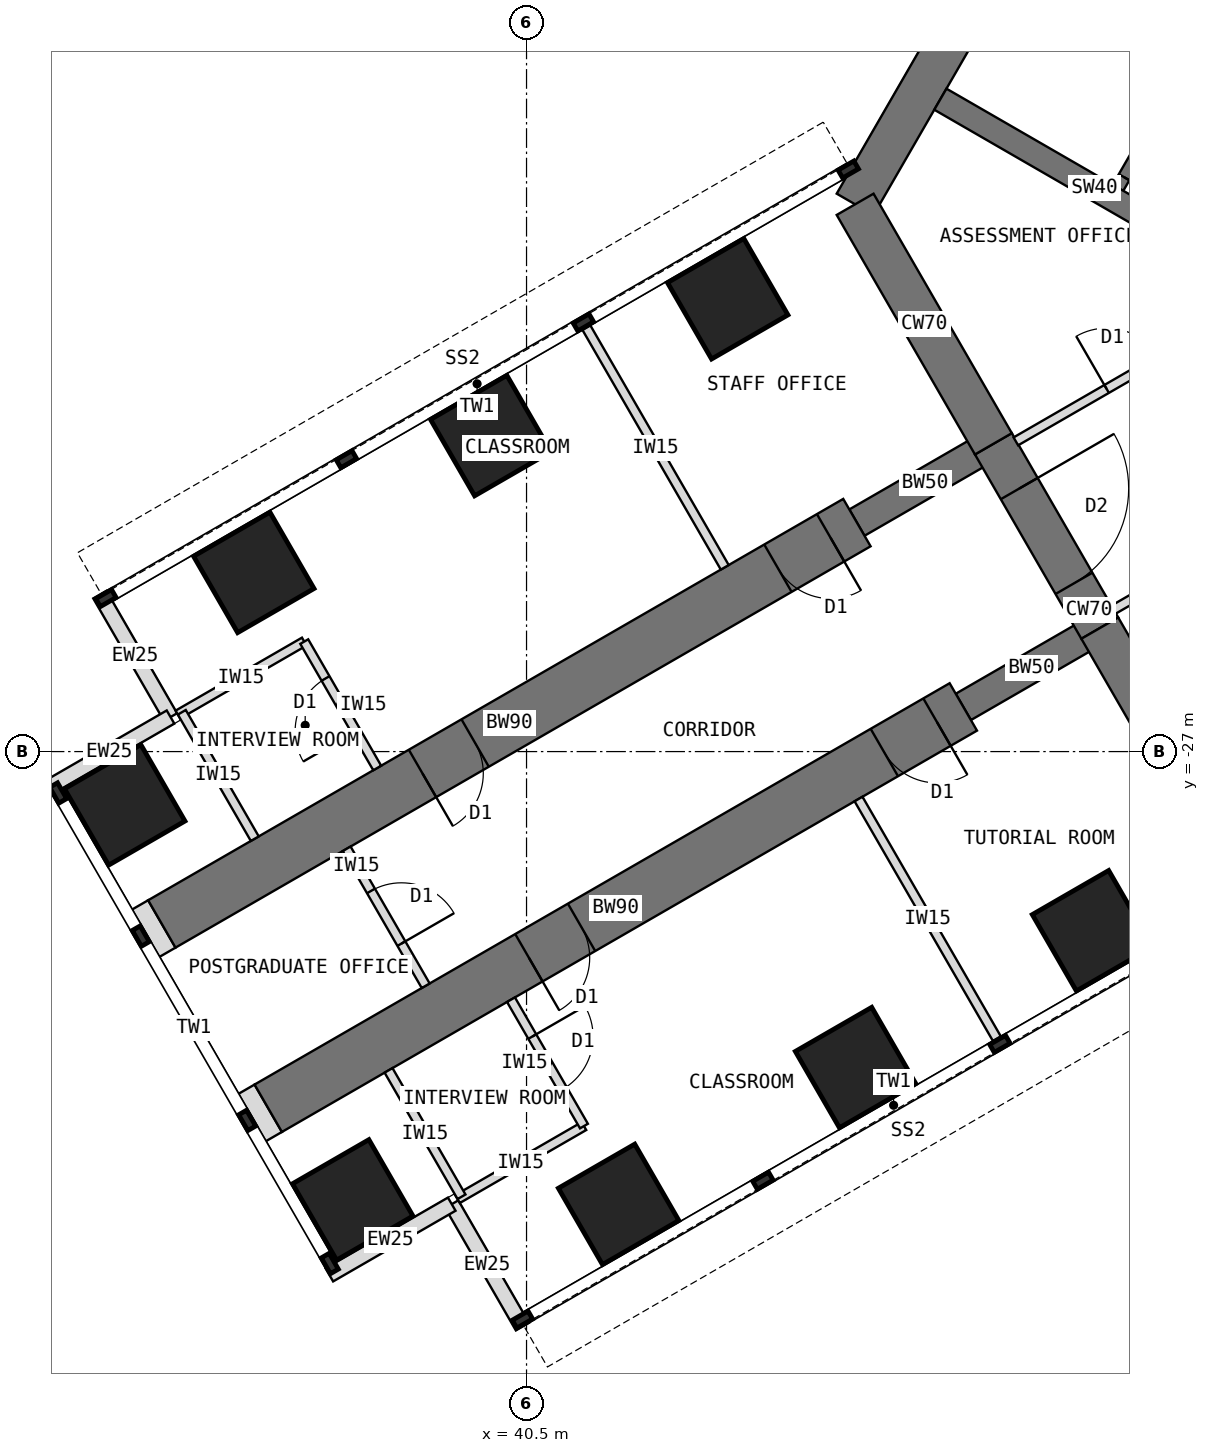
"""IFC4 building model, lengths in metres.
Left out: names, types, materials, properties, quantities, classifications, styles, units other than length and angle.
Written with IfcOpenShell. Run it as: python <this file> out.ifc"""

import sys

from ifc_helpers import new_model, si_unit, direction, frame, frame_2d, origin, origin_2d, place, context, subcontext, project, spatial, rectangle, extrude, element, fill, save


model = new_model("IFC4")
c1 = context("Model", 3, precision=1e-05, world=origin(), true_north=direction((0.0, 1.0)))
c2 = subcontext(c1, "Body", "Model", "MODEL_VIEW")
j1 = project(units=[si_unit("LENGTHUNIT", "METRE"), si_unit("PLANEANGLEUNIT", "RADIAN")], contexts=[c1])
p1 = place(None, origin())
s1 = spatial("IfcSite", under=j1, at=p1, CompositionType="ELEMENT")
p2 = place(p1, origin())
s2 = spatial("IfcBuilding", under=s1, at=p2, CompositionType="ELEMENT")
p3 = place(p2, frame((0.0, 0.0, 48.5)))
s3 = spatial("IfcBuildingStorey", under=s2, at=p3, CompositionType="ELEMENT", Elevation=48.5)
p4 = place(p3, frame((52.202, -7.092, 0.0), z_axis=(0.0, 0.0, 1.0), x_axis=(-0.500005998175, -0.866021940709, 0.0)))
e1 = element("IfcWall", 1, at=p4, inside=s3, PredefinedType="SHEAR", context=c2, shape_type="SweptSolid", body=[
    extrude(rectangle(XDim=12.596, YDim=0.7, at=frame_2d((6.298, 0.0))), origin(), (0.0, 0.0, 1.0), 4.0),
])
p5 = place(p3, frame((45.904, -18.0, 0.0), z_axis=(0.0, 0.0, 1.0), x_axis=(0.500024481964, -0.866011268655, 0.0)))
e2 = element("IfcWall", 2, at=p5, inside=s3, PredefinedType="SHEAR", context=c2, shape_type="SweptSolid", body=[
    extrude(rectangle(XDim=4.548, YDim=0.7, at=frame_2d((2.274, 0.0))), origin(), (0.0, 0.0, 1.0), 4.0),
])
p6 = place(p3, frame((48.178, -21.939, 0.0), z_axis=(0.0, 0.0, 1.0), x_axis=(0.500010275428, -0.866019471182, 0.0)))
e3 = element("IfcWall", 3, at=p6, inside=s3, PredefinedType="SHEAR", context=c2, shape_type="SweptSolid", body=[
    extrude(rectangle(XDim=3.5, YDim=0.7, at=frame_2d((1.75, 0.0))), origin(), (0.0, 0.0, 1.0), 4.0),
])
p7 = place(p6, frame((0.85, 0.0, 0.0)))
e4 = element("IfcOpeningElement", 4, at=p7, cuts=e3, PredefinedType="OPENING", context=c2, shape_type="SweptSolid", body=[
    extrude(rectangle(XDim=1.8, YDim=2.1, at=frame_2d((0.9, 1.05))), frame((0.0, 0.36, 0.0), z_axis=(0.0, -1.0, 0.0), x_axis=(1.0, 0.0, 0.0)), (0.0, 0.0, 1.0), 0.72),
])
p8 = place(p3, frame((49.928, -24.97, 0.0), z_axis=(0.0, 0.0, 1.0), x_axis=(0.499984222037, -0.866034513004, 0.0)))
e5 = element("IfcWall", 5, at=p8, inside=s3, PredefinedType="SHEAR", context=c2, shape_type="SweptSolid", body=[
    extrude(rectangle(XDim=4.548, YDim=0.7, at=frame_2d((2.274, 0.0))), origin(), (0.0, 0.0, 1.0), 4.0),
])
p9 = place(p3, frame((49.928, -24.97, 0.0), z_axis=(0.0, 0.0, 1.0), x_axis=(-0.866031863473, -0.499988811324, 0.0)))
e6 = element("IfcWall", 6, at=p9, inside=s3, PredefinedType="SHEAR", context=c2, shape_type="SweptSolid", body=[
    extrude(rectangle(XDim=2.592, YDim=0.5, at=frame_2d((1.296, 0.0))), origin(), (0.0, 0.0, 1.0), 4.0),
])
p10 = place(p3, frame((47.684, -26.266, 0.0), z_axis=(0.0, 0.0, 1.0), x_axis=(-0.866027579429, -0.499996231654, 0.0)))
e7 = element("IfcWall", 7, at=p10, inside=s3, PredefinedType="SHEAR", context=c2, shape_type="SweptSolid", body=[
    extrude(rectangle(XDim=13.2, YDim=0.9, at=frame_2d((6.6, 0.0))), origin(), (0.0, 0.0, 1.0), 4.0),
])
p11 = place(p10, frame((0.5, 0.0, 0.0)))
e8 = element("IfcOpeningElement", 8, at=p11, cuts=e7, PredefinedType="OPENING", context=c2, shape_type="SweptSolid", body=[
    extrude(rectangle(XDim=1.0, YDim=2.1, at=frame_2d((0.5, 1.05))), frame((0.0, 0.46, 0.0), z_axis=(0.0, -1.0, 0.0), x_axis=(1.0, 0.0, 0.0)), (0.0, 0.0, 1.0), 0.92),
])
p12 = place(p10, frame((7.25, 0.0, 0.0)))
e9 = element("IfcOpeningElement", 9, at=p12, cuts=e7, PredefinedType="OPENING", context=c2, shape_type="SweptSolid", body=[
    extrude(rectangle(XDim=1.0, YDim=2.1, at=frame_2d((0.5, 1.05))), frame((0.0, 0.46, 0.0), z_axis=(0.0, -1.0, 0.0), x_axis=(1.0, 0.0, 0.0)), (0.0, 0.0, 1.0), 0.92),
])
p13 = place(p3, frame((48.178, -21.939, 0.0), z_axis=(0.0, 0.0, 1.0), x_axis=(-0.866072649678, -0.499918158782, 0.0)))
e10 = element("IfcWall", 10, at=p13, inside=s3, PredefinedType="SHEAR", context=c2, shape_type="SweptSolid", body=[
    extrude(rectangle(XDim=2.592, YDim=0.5, at=frame_2d((1.296, 0.0))), origin(), (0.0, 0.0, 1.0), 4.0),
])
p14 = place(p3, frame((45.934, -23.234, 0.0), z_axis=(0.0, 0.0, 1.0), x_axis=(-0.866019570528, -0.500010103361, 0.0)))
e11 = element("IfcWall", 11, at=p14, inside=s3, PredefinedType="SHEAR", context=c2, shape_type="SweptSolid", body=[
    extrude(rectangle(XDim=13.2, YDim=0.9, at=frame_2d((6.6, 0.0))), origin(), (0.0, 0.0, 1.0), 4.0),
])
p15 = place(p14, frame((0.5, 0.0, 0.0)))
e12 = element("IfcOpeningElement", 12, at=p15, cuts=e11, PredefinedType="OPENING", context=c2, shape_type="SweptSolid", body=[
    extrude(rectangle(XDim=1.0, YDim=2.1, at=frame_2d((0.5, 1.05))), frame((0.0, 0.46, 0.0), z_axis=(0.0, -1.0, 0.0), x_axis=(1.0, 0.0, 0.0)), (0.0, 0.0, 1.0), 0.92),
])
p16 = place(p14, frame((7.25, 0.0, 0.0)))
e13 = element("IfcOpeningElement", 13, at=p16, cuts=e11, PredefinedType="OPENING", context=c2, shape_type="SweptSolid", body=[
    extrude(rectangle(XDim=1.0, YDim=2.1, at=frame_2d((0.5, 1.05))), frame((0.0, 0.46, 0.0), z_axis=(0.0, -1.0, 0.0), x_axis=(1.0, 0.0, 0.0)), (0.0, 0.0, 1.0), 0.92),
])
for number, where, z_axis, x_axis in (
    (14, (49.809, -29.946, 0.0), (0.0, 0.0, 1.0), (0.866, 0.5, 0.0)),
    (15, (43.809, -19.554, 0.0), (0.0, 0.0, 1.0), (0.866, 0.5, 0.0)),
    (16, (45.912, -32.196, 0.0), (0.0, 0.0, 1.0), (0.866, 0.5, 0.0)),
    (17, (39.912, -21.804, 0.0), (0.0, 0.0, 1.0), (0.866, 0.5, 0.0)),
    (18, (42.014, -34.446, 0.0), (0.0, 0.0, 1.0), (0.866, 0.5, 0.0)),
    (19, (36.014, -24.054, 0.0), (0.0, 0.0, 1.0), (0.866, 0.5, 0.0)),
    (20, (37.642, -34.373, 0.0), (0.0, 0.0, 1.0), (0.866, 0.5, 0.0)),
    (21, (33.892, -27.877, 0.0), (0.0, 0.0, 1.0), (0.866, 0.5, 0.0)),
):
    element("IfcColumn", number, at=place(p3, frame(where, z_axis=z_axis, x_axis=x_axis)), inside=s3, PredefinedType="COLUMN", context=c2, shape_type="SweptSolid", body=[
        extrude(rectangle(XDim=1.45, YDim=1.45, at=origin_2d()), origin(), (0.0, 0.0, 1.0), 4.0),
    ])
for number, where, z_axis, x_axis in (
    (22, (40.433, -36.456, 0.0), (0.0, 0.0, 1.0), (-0.5, 0.866, 0.0)),
    (23, (39.27, -34.443, 0.0), (0.0, 0.0, 1.0), (-0.866, -0.5, 0.0)),
    (24, (33.483, -24.419, 0.0), (0.0, 0.0, 1.0), (0.5, -0.866, 0.0)),
    (25, (34.645, -26.432, 0.0), (0.0, 0.0, 1.0), (-0.866, -0.5, 0.0)),
):
    element("IfcWall", number, at=place(p3, frame(where, z_axis=z_axis, x_axis=x_axis)), inside=s3, PredefinedType="STANDARD", context=c2, shape_type="SweptSolid", body=[
        extrude(rectangle(XDim=2.325, YDim=0.25, at=frame_2d((1.163, 0.0))), origin(), (0.0, 0.0, 1.0), 3.8),
    ])
for number, where, z_axis, x_axis in (
    (26, (36.252, -32.865, 0.0), (0.0, 0.0, 1.0), (-0.866, -0.5, 0.0)),
    (27, (34.502, -29.834, 0.0), (0.0, 0.0, 1.0), (-0.866, -0.5, 0.0)),
):
    element("IfcWall", number, at=place(p3, frame(where, z_axis=z_axis, x_axis=x_axis)), inside=s3, PredefinedType="PARTITIONING", context=c2, shape_type="SweptSolid", body=[
        extrude(rectangle(XDim=0.31, YDim=0.9, at=frame_2d((0.155, 0.0))), origin(), (0.0, 0.0, 1.0), 3.8),
    ])
p17 = place(p3, frame((54.178, -10.886, 0.0), z_axis=(0.0, 0.0, 1.0), x_axis=(-0.49999894854, -0.866026010844, 0.0)))
e28 = element("IfcWall", 28, at=p17, inside=s3, PredefinedType="SHEAR", context=c2, shape_type="SweptSolid", body=[
    extrude(rectangle(XDim=8.0, YDim=0.2, at=frame_2d((4.0, 0.0))), origin(), (0.0, 0.0, 1.0), 4.0),
])
p18 = place(p17, frame((6.8, 0.0, 0.0)))
e29 = element("IfcOpeningElement", 29, at=p18, cuts=e28, PredefinedType="OPENING", context=c2, shape_type="SweptSolid", body=[
    extrude(rectangle(XDim=0.9, YDim=2.1, at=frame_2d((0.45, 1.05))), frame((0.0, 0.11, 0.0), z_axis=(0.0, -1.0, 0.0), x_axis=(1.0, 0.0, 0.0)), (0.0, 0.0, 1.0), 0.22),
])
p19 = place(p3, frame((52.38, -19.201, 0.0), z_axis=(0.0, 0.0, 1.0), x_axis=(-0.866023886965, 0.500002627198, 0.0)))
e30 = element("IfcWall", 30, at=p19, inside=s3, PredefinedType="SHEAR", context=c2, shape_type="SweptSolid", body=[
    extrude(rectangle(XDim=5.858, YDim=0.4, at=frame_2d((2.929, 0.0))), origin(), (0.0, 0.0, 1.0), 4.0),
])
p20 = place(p3, frame((45.96, -27.78, 0.0), z_axis=(0.0, 0.0, 1.0), x_axis=(0.499982560684, -0.866035472144, 0.0)))
e31 = element("IfcWall", 31, at=p20, inside=s3, PredefinedType="PARTITIONING", context=c2, shape_type="SweptSolid", body=[
    extrude(rectangle(XDim=4.55, YDim=0.15, at=frame_2d((2.275, 0.0))), origin(), (0.0, 0.0, 1.0), 3.8),
])
p21 = place(p3, frame((41.444, -33.159, 0.0), z_axis=(0.0, 0.0, 1.0), x_axis=(-0.866024647952, -0.500001309137, 0.0)))
e32 = element("IfcWall", 32, at=p21, inside=s3, PredefinedType="PARTITIONING", context=c2, shape_type="SweptSolid", body=[
    extrude(rectangle(XDim=2.4, YDim=0.15, at=frame_2d((1.2, 0.0))), origin(), (0.0, 0.0, 1.0), 3.8),
])
p22 = place(p3, frame((40.244, -31.08, 0.0), z_axis=(0.0, 0.0, 1.0), x_axis=(0.500001309137, -0.866024647952, 0.0)))
e33 = element("IfcWall", 33, at=p22, inside=s3, PredefinedType="PARTITIONING", context=c2, shape_type="SweptSolid", body=[
    extrude(rectangle(XDim=2.4, YDim=0.15, at=frame_2d((1.2, 0.0))), origin(), (0.0, 0.0, 1.0), 3.8),
])
p23 = place(p22, frame((0.7, 0.0, 0.0)))
e34 = element("IfcOpeningElement", 34, at=p23, cuts=e33, PredefinedType="OPENING", context=c2, shape_type="SweptSolid", body=[
    extrude(rectangle(XDim=1.0, YDim=2.1, at=frame_2d((0.5, 1.05))), frame((0.0, 0.085, 0.0), z_axis=(0.0, -1.0, 0.0), x_axis=(1.0, 0.0, 0.0)), (0.0, 0.0, 1.0), 0.17),
])
p24 = place(p3, frame((38.231, -32.243, 0.0), z_axis=(0.0, 0.0, 1.0), x_axis=(0.500033551112, -0.866006032174, 0.0)))
e35 = element("IfcWall", 35, at=p24, inside=s3, PredefinedType="PARTITIONING", context=c2, shape_type="SweptSolid", body=[
    extrude(rectangle(XDim=2.4, YDim=0.15, at=frame_2d((1.2, 0.0))), origin(), (0.0, 0.0, 1.0), 3.8),
])
p25 = place(p3, frame((43.76, -23.97, 0.0), z_axis=(0.0, 0.0, 1.0), x_axis=(-0.499982560684, 0.866035472144, 0.0)))
e36 = element("IfcWall", 36, at=p25, inside=s3, PredefinedType="PARTITIONING", context=c2, shape_type="SweptSolid", body=[
    extrude(rectangle(XDim=4.55, YDim=0.15, at=frame_2d((2.275, 0.0))), origin(), (0.0, 0.0, 1.0), 3.8),
])
p26 = place(p3, frame((36.844, -25.191, 0.0), z_axis=(0.0, 0.0, 1.0), x_axis=(-0.865980596518, -0.500077600433, 0.0)))
e37 = element("IfcWall", 37, at=p26, inside=s3, PredefinedType="PARTITIONING", context=c2, shape_type="SweptSolid", body=[
    extrude(rectangle(XDim=2.4, YDim=0.15, at=frame_2d((1.2, 0.0))), origin(), (0.0, 0.0, 1.0), 3.8),
])
p27 = place(p3, frame((38.044, -27.27, 0.0), z_axis=(0.0, 0.0, 1.0), x_axis=(-0.500033551112, 0.866006032174, 0.0)))
e38 = element("IfcWall", 38, at=p27, inside=s3, PredefinedType="PARTITIONING", context=c2, shape_type="SweptSolid", body=[
    extrude(rectangle(XDim=2.4, YDim=0.15, at=frame_2d((1.2, 0.0))), origin(), (0.0, 0.0, 1.0), 3.8),
])
p28 = place(p27, frame((0.7, 0.0, 0.0)))
e39 = element("IfcOpeningElement", 39, at=p28, cuts=e38, PredefinedType="OPENING", context=c2, shape_type="SweptSolid", body=[
    extrude(rectangle(XDim=1.0, YDim=2.1, at=frame_2d((0.5, 1.05))), frame((0.0, 0.085, 0.0), z_axis=(0.0, -1.0, 0.0), x_axis=(1.0, 0.0, 0.0)), (0.0, 0.0, 1.0), 0.17),
])
p29 = place(p3, frame((36.031, -28.432, 0.0), z_axis=(0.0, 0.0, 1.0), x_axis=(-0.500001309137, 0.866024647952, 0.0)))
e40 = element("IfcWall", 40, at=p29, inside=s3, PredefinedType="PARTITIONING", context=c2, shape_type="SweptSolid", body=[
    extrude(rectangle(XDim=2.4, YDim=0.15, at=frame_2d((1.2, 0.0))), origin(), (0.0, 0.0, 1.0), 3.8),
])
p30 = place(p3, frame((54.017, -22.436, 0.0), z_axis=(0.0, 0.0, 1.0), x_axis=(-0.866015446554, -0.500017246033, 0.0)))
e41 = element("IfcWall", 41, at=p30, inside=s3, PredefinedType="PARTITIONING", context=c2, shape_type="SweptSolid", body=[
    extrude(rectangle(XDim=4.469, YDim=0.15, at=frame_2d((2.234, 0.0))), origin(), (0.0, 0.0, 1.0), 3.8),
])
p31 = place(p30, frame((1.744, 0.0, 0.0)))
e42 = element("IfcOpeningElement", 42, at=p31, cuts=e41, PredefinedType="OPENING", context=c2, shape_type="SweptSolid", body=[
    extrude(rectangle(XDim=1.0, YDim=2.1, at=frame_2d((0.5, 1.05))), frame((0.0, 0.085, 0.0), z_axis=(0.0, -1.0, 0.0), x_axis=(1.0, 0.0, 0.0)), (0.0, 0.0, 1.0), 0.17),
])
p32 = place(p3, frame((48.548, -21.898, 0.0), z_axis=(0.0, 0.0, 1.0), x_axis=(0.866025445582, 0.499999927604, 0.0)))
e43 = element("IfcWall", 43, at=p32, inside=s3, PredefinedType="PARTITIONING", context=c2, shape_type="SweptSolid", body=[
    extrude(rectangle(XDim=4.468, YDim=0.15, at=frame_2d((2.234, 0.0))), origin(), (0.0, 0.0, 1.0), 3.8),
])
p33 = place(p32, frame((1.724, 0.0, 0.0)))
e44 = element("IfcOpeningElement", 44, at=p33, cuts=e43, PredefinedType="OPENING", context=c2, shape_type="SweptSolid", body=[
    extrude(rectangle(XDim=1.0, YDim=2.1, at=frame_2d((0.5, 1.05))), frame((0.0, 0.085, 0.0), z_axis=(0.0, -1.0, 0.0), x_axis=(1.0, 0.0, 0.0)), (0.0, 0.0, 1.0), 0.17),
])
p34 = place(p3, frame((37.542, -28.599, 0.0), z_axis=(0.0, 0.0, 1.0), x_axis=(0.500006934395, -0.866021400173, 0.0)))
e45 = element("IfcWall", 45, at=p34, inside=s3, PredefinedType="PARTITIONING", context=c2, shape_type="SweptSolid", body=[
    extrude(rectangle(XDim=2.6, YDim=0.15, at=frame_2d((1.3, 0.0))), origin(), (0.0, 0.0, 1.0), 3.8),
])
p35 = place(p34, frame((0.8, 0.0, 0.0)))
e46 = element("IfcOpeningElement", 46, at=p35, cuts=e45, PredefinedType="OPENING", context=c2, shape_type="SweptSolid", body=[
    extrude(rectangle(XDim=1.0, YDim=2.1, at=frame_2d((0.5, 1.05))), frame((0.0, 0.085, 0.0), z_axis=(0.0, -1.0, 0.0), x_axis=(1.0, 0.0, 0.0)), (0.0, 0.0, 1.0), 0.17),
])
p36 = place(p18, origin())
e47 = element("IfcDoor", 47, at=p36, inside=s3, OperationType="SINGLE_SWING_RIGHT", PredefinedType="DOOR", context=c2, shape_type="SweptSolid", body=[
    extrude(rectangle(XDim=0.9, YDim=2.1, at=frame_2d((0.45, 1.05))), frame((0.0, 0.025, 0.0), z_axis=(0.0, -1.0, 0.0), x_axis=(1.0, 0.0, 0.0)), (0.0, 0.0, 1.0), 0.05),
])
fill(e29, e47)
p37 = place(p7, origin())
e48 = element("IfcDoor", 48, at=p37, inside=s3, OperationType="DOUBLE_DOOR_DOUBLE_SWING", PredefinedType="DOOR", context=c2, shape_type="SweptSolid", body=[
    extrude(rectangle(XDim=1.72, YDim=2.06, at=frame_2d((0.9, 1.03))), frame((0.0, 0.025, 0.0), z_axis=(0.0, -1.0, 0.0), x_axis=(1.0, 0.0, 0.0)), (0.0, 0.0, 1.0), 0.05),
    extrude(rectangle(XDim=0.04, YDim=2.1, at=frame_2d((0.02, 1.05))), frame((0.0, 0.35, 0.0), z_axis=(0.0, -1.0, 0.0), x_axis=(1.0, 0.0, 0.0)), (0.0, 0.0, 1.0), 0.699),
    extrude(rectangle(XDim=0.04, YDim=2.1, at=frame_2d((1.78, 1.05))), frame((0.0, 0.35, 0.0), z_axis=(0.0, -1.0, 0.0), x_axis=(1.0, 0.0, 0.0)), (0.0, 0.0, 1.0), 0.699),
    extrude(rectangle(XDim=1.72, YDim=0.04, at=frame_2d((0.9, 2.08))), frame((0.0, 0.35, 0.0), z_axis=(0.0, -1.0, 0.0), x_axis=(1.0, 0.0, 0.0)), (0.0, 0.0, 1.0), 0.699),
])
fill(e4, e48)
p38 = place(p23, origin())
e49 = element("IfcDoor", 49, at=p38, inside=s3, OperationType="SINGLE_SWING_LEFT", PredefinedType="DOOR", context=c2, shape_type="SweptSolid", body=[
    extrude(rectangle(XDim=1.0, YDim=2.1, at=frame_2d((0.5, 1.05))), frame((0.0, 0.025, 0.0), z_axis=(0.0, -1.0, 0.0), x_axis=(1.0, 0.0, 0.0)), (0.0, 0.0, 1.0), 0.05),
])
fill(e34, e49)
p39 = place(p28, origin())
e50 = element("IfcDoor", 50, at=p39, inside=s3, OperationType="SINGLE_SWING_LEFT", PredefinedType="DOOR", context=c2, shape_type="SweptSolid", body=[
    extrude(rectangle(XDim=1.0, YDim=2.1, at=frame_2d((0.5, 1.05))), frame((0.0, 0.025, 0.0), z_axis=(0.0, -1.0, 0.0), x_axis=(1.0, 0.0, 0.0)), (0.0, 0.0, 1.0), 0.05),
])
fill(e39, e50)
p40 = place(p33, origin())
e51 = element("IfcDoor", 51, at=p40, inside=s3, OperationType="SINGLE_SWING_LEFT", PredefinedType="DOOR", context=c2, shape_type="SweptSolid", body=[
    extrude(rectangle(XDim=1.0, YDim=2.1, at=frame_2d((0.5, 1.05))), frame((0.0, 0.025, 0.0), z_axis=(0.0, -1.0, 0.0), x_axis=(1.0, 0.0, 0.0)), (0.0, 0.0, 1.0), 0.05),
])
fill(e44, e51)
p41 = place(p35, origin())
e52 = element("IfcDoor", 52, at=p41, inside=s3, OperationType="SINGLE_SWING_RIGHT", PredefinedType="DOOR", context=c2, shape_type="SweptSolid", body=[
    extrude(rectangle(XDim=1.0, YDim=2.1, at=frame_2d((0.5, 1.05))), frame((0.0, 0.025, 0.0), z_axis=(0.0, -1.0, 0.0), x_axis=(1.0, 0.0, 0.0)), (0.0, 0.0, 1.0), 0.05),
])
fill(e46, e52)
p42 = place(p11, origin())
e53 = element("IfcDoor", 53, at=p42, inside=s3, OperationType="SINGLE_SWING_LEFT", PredefinedType="DOOR", context=c2, shape_type="SweptSolid", body=[
    extrude(rectangle(XDim=0.92, YDim=2.06, at=frame_2d((0.5, 1.03))), frame((0.0, 0.025, 0.0), z_axis=(0.0, -1.0, 0.0), x_axis=(1.0, 0.0, 0.0)), (0.0, 0.0, 1.0), 0.05),
    extrude(rectangle(XDim=0.04, YDim=2.1, at=frame_2d((0.02, 1.05))), frame((0.0, 0.45, 0.0), z_axis=(0.0, -1.0, 0.0), x_axis=(1.0, 0.0, 0.0)), (0.0, 0.0, 1.0), 0.899),
    extrude(rectangle(XDim=0.04, YDim=2.1, at=frame_2d((0.98, 1.05))), frame((0.0, 0.45, 0.0), z_axis=(0.0, -1.0, 0.0), x_axis=(1.0, 0.0, 0.0)), (0.0, 0.0, 1.0), 0.899),
    extrude(rectangle(XDim=0.92, YDim=0.04, at=frame_2d((0.5, 2.08))), frame((0.0, 0.45, 0.0), z_axis=(0.0, -1.0, 0.0), x_axis=(1.0, 0.0, 0.0)), (0.0, 0.0, 1.0), 0.899),
])
fill(e8, e53)
p43 = place(p12, origin())
e54 = element("IfcDoor", 54, at=p43, inside=s3, OperationType="SINGLE_SWING_RIGHT", PredefinedType="DOOR", context=c2, shape_type="SweptSolid", body=[
    extrude(rectangle(XDim=0.92, YDim=2.06, at=frame_2d((0.5, 1.03))), frame((0.0, 0.025, 0.0), z_axis=(0.0, -1.0, 0.0), x_axis=(1.0, 0.0, 0.0)), (0.0, 0.0, 1.0), 0.05),
    extrude(rectangle(XDim=0.04, YDim=2.1, at=frame_2d((0.02, 1.05))), frame((0.0, 0.45, 0.0), z_axis=(0.0, -1.0, 0.0), x_axis=(1.0, 0.0, 0.0)), (0.0, 0.0, 1.0), 0.899),
    extrude(rectangle(XDim=0.04, YDim=2.1, at=frame_2d((0.98, 1.05))), frame((0.0, 0.45, 0.0), z_axis=(0.0, -1.0, 0.0), x_axis=(1.0, 0.0, 0.0)), (0.0, 0.0, 1.0), 0.899),
    extrude(rectangle(XDim=0.92, YDim=0.04, at=frame_2d((0.5, 2.08))), frame((0.0, 0.45, 0.0), z_axis=(0.0, -1.0, 0.0), x_axis=(1.0, 0.0, 0.0)), (0.0, 0.0, 1.0), 0.899),
])
fill(e9, e54)
p44 = place(p15, origin())
e55 = element("IfcDoor", 55, at=p44, inside=s3, OperationType="SINGLE_SWING_LEFT", PredefinedType="DOOR", context=c2, shape_type="SweptSolid", body=[
    extrude(rectangle(XDim=0.92, YDim=2.06, at=frame_2d((0.5, 1.03))), frame((0.0, 0.025, 0.0), z_axis=(0.0, -1.0, 0.0), x_axis=(1.0, 0.0, 0.0)), (0.0, 0.0, 1.0), 0.05),
    extrude(rectangle(XDim=0.04, YDim=2.1, at=frame_2d((0.02, 1.05))), frame((0.0, 0.45, 0.0), z_axis=(0.0, -1.0, 0.0), x_axis=(1.0, 0.0, 0.0)), (0.0, 0.0, 1.0), 0.899),
    extrude(rectangle(XDim=0.04, YDim=2.1, at=frame_2d((0.98, 1.05))), frame((0.0, 0.45, 0.0), z_axis=(0.0, -1.0, 0.0), x_axis=(1.0, 0.0, 0.0)), (0.0, 0.0, 1.0), 0.899),
    extrude(rectangle(XDim=0.92, YDim=0.04, at=frame_2d((0.5, 2.08))), frame((0.0, 0.45, 0.0), z_axis=(0.0, -1.0, 0.0), x_axis=(1.0, 0.0, 0.0)), (0.0, 0.0, 1.0), 0.899),
])
fill(e12, e55)
p45 = place(p16, origin())
e56 = element("IfcDoor", 56, at=p45, inside=s3, OperationType="SINGLE_SWING_RIGHT", PredefinedType="DOOR", context=c2, shape_type="SweptSolid", body=[
    extrude(rectangle(XDim=0.92, YDim=2.06, at=frame_2d((0.5, 1.03))), frame((0.0, 0.025, 0.0), z_axis=(0.0, -1.0, 0.0), x_axis=(1.0, 0.0, 0.0)), (0.0, 0.0, 1.0), 0.05),
    extrude(rectangle(XDim=0.04, YDim=2.1, at=frame_2d((0.02, 1.05))), frame((0.0, 0.45, 0.0), z_axis=(0.0, -1.0, 0.0), x_axis=(1.0, 0.0, 0.0)), (0.0, 0.0, 1.0), 0.899),
    extrude(rectangle(XDim=0.04, YDim=2.1, at=frame_2d((0.98, 1.05))), frame((0.0, 0.45, 0.0), z_axis=(0.0, -1.0, 0.0), x_axis=(1.0, 0.0, 0.0)), (0.0, 0.0, 1.0), 0.899),
    extrude(rectangle(XDim=0.92, YDim=0.04, at=frame_2d((0.5, 2.08))), frame((0.0, 0.45, 0.0), z_axis=(0.0, -1.0, 0.0), x_axis=(1.0, 0.0, 0.0)), (0.0, 0.0, 1.0), 0.899),
])
fill(e13, e56)
save(model, sys.argv[1])
